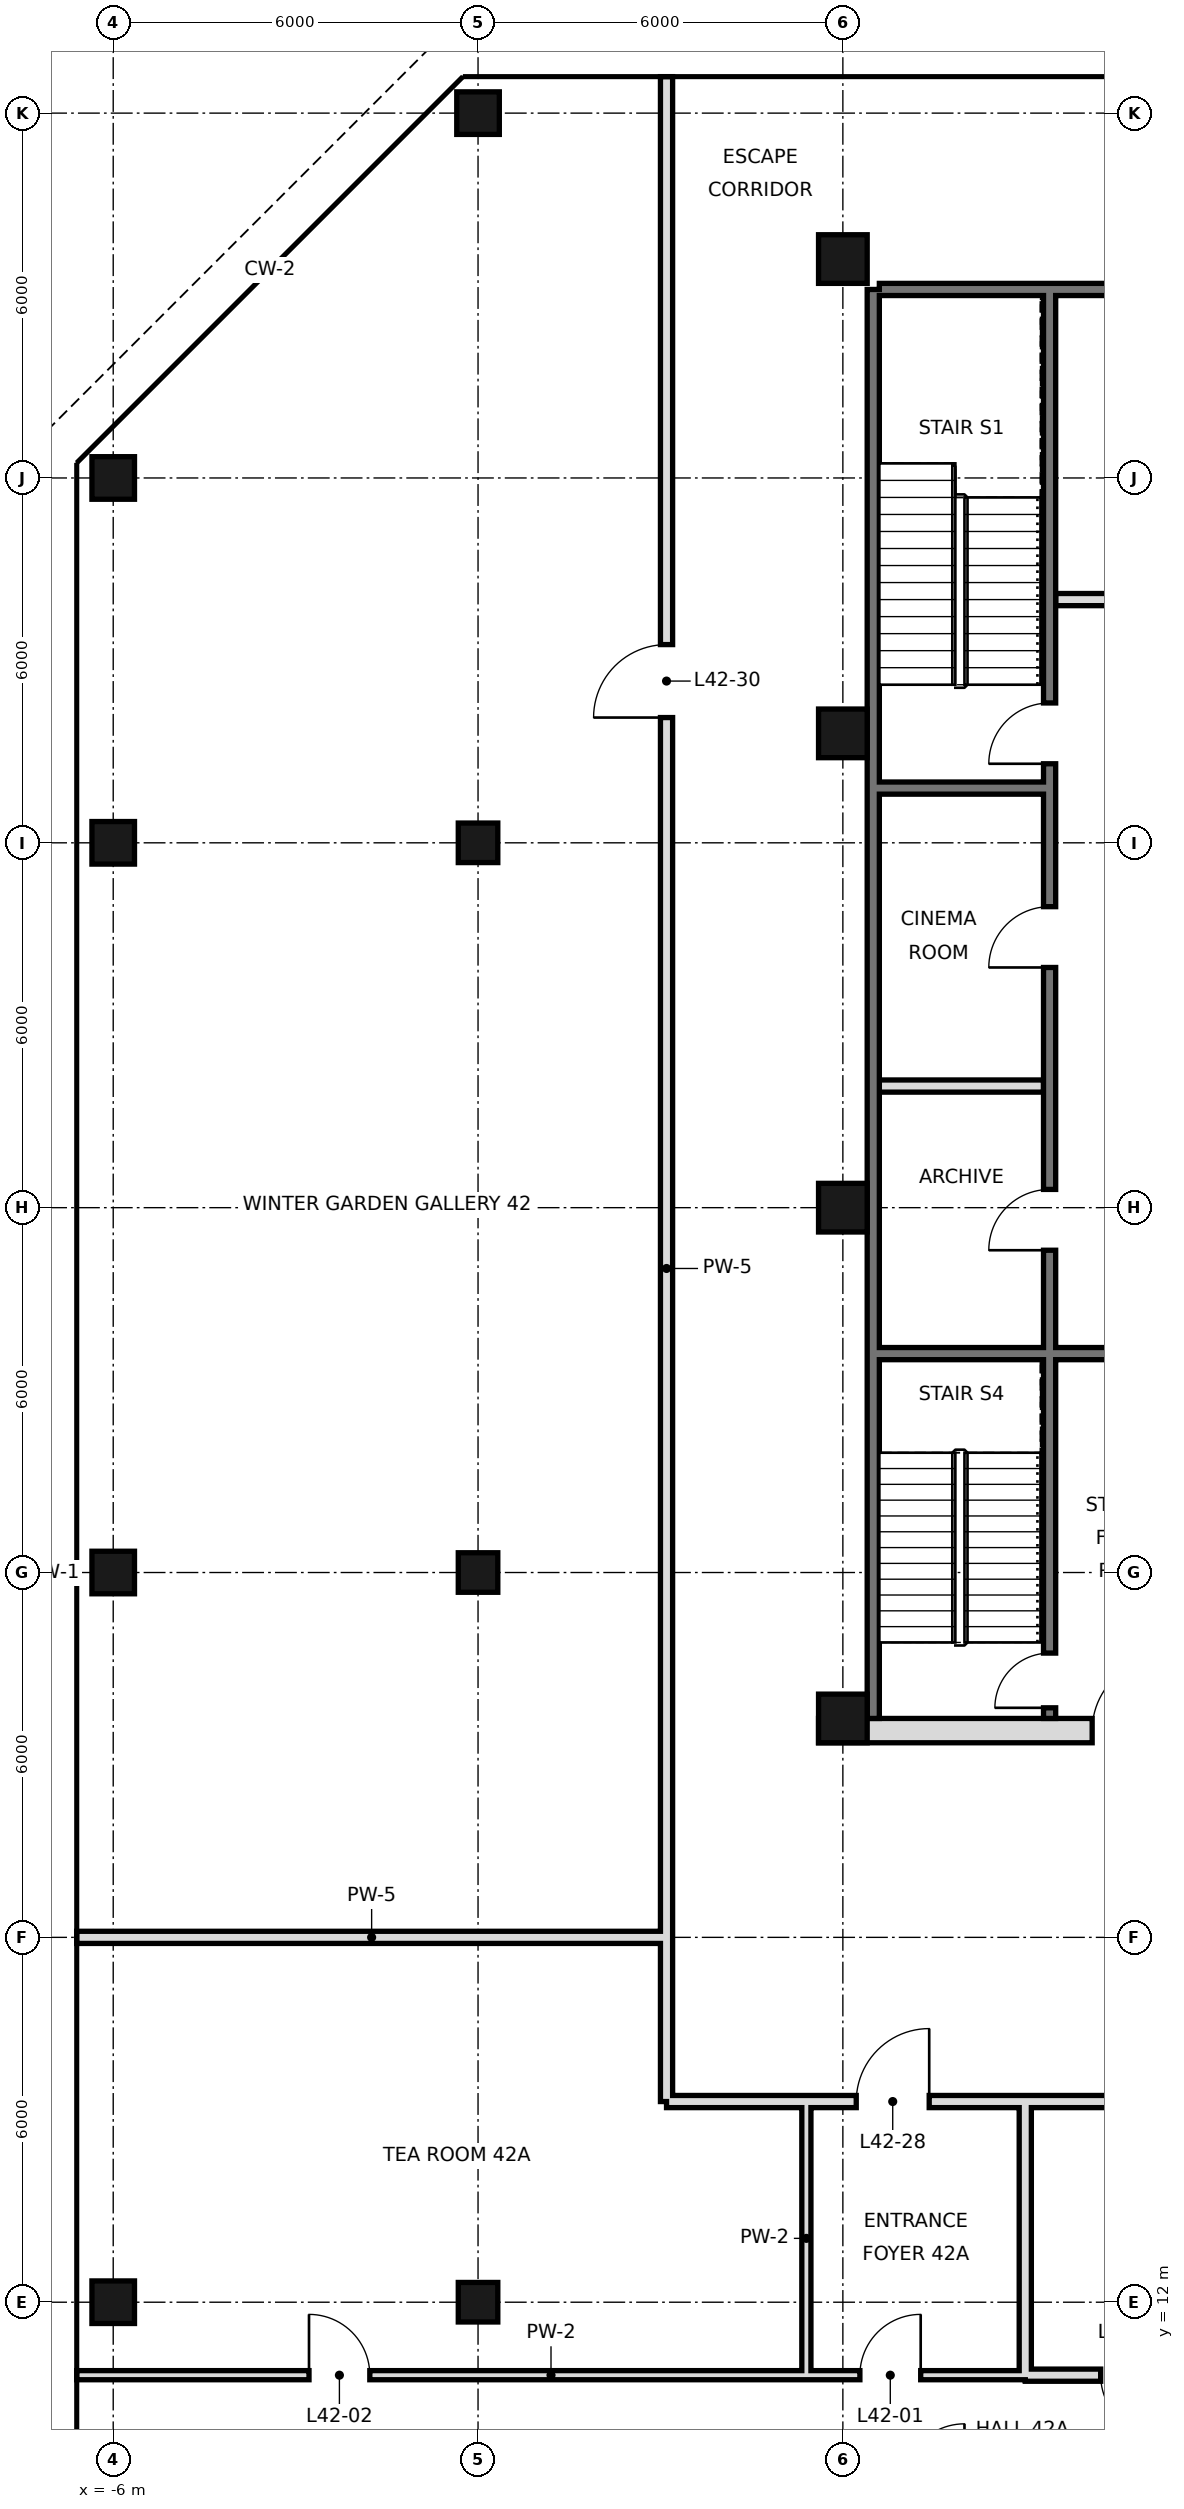
"""IFC4 building model, lengths in metres.
Left out: names, types, materials, properties, quantities, classifications, styles, units other than length and angle.
Written with IfcOpenShell. Run it as: python <this file> out.ifc"""

import sys

from ifc_helpers import new_model, si_unit, direction, frame, frame_2d, origin, origin_2d, place, context, subcontext, project, spatial, rectangle, hollow_rectangle, extrude, element, fill, save


model = new_model("IFC4")
c1 = context("Model", 3, precision=1e-05, world=origin(), true_north=direction((0.0, 1.0)))
c2 = subcontext(c1, "Body", "Model", "MODEL_VIEW")
j1 = project(units=[si_unit("LENGTHUNIT", "METRE"), si_unit("PLANEANGLEUNIT", "RADIAN")], contexts=[c1])
p1 = place(None, origin())
s1 = spatial("IfcSite", under=j1, at=p1, CompositionType="ELEMENT")
p2 = place(p1, origin())
s2 = spatial("IfcBuilding", under=s1, at=p2, CompositionType="ELEMENT")
p3 = place(p2, frame((0.0, 0.0, 181.6)))
s3 = spatial("IfcBuildingStorey", under=s2, at=p3, CompositionType="ELEMENT", Elevation=181.6)
for number, where, z_axis, x_axis in (
    (1, (-6.0, 12.0, 0.0), (0.0, 0.0, 1.0), (1.0, 0.0, 0.0)),
    (2, (-6.0, 24.0, 0.0), (0.0, 0.0, 1.0), (1.0, 0.0, 0.0)),
    (3, (-6.0, 36.0, 0.0), (0.0, 0.0, 1.0), (1.0, 0.0, 0.0)),
    (4, (-6.0, 42.0, 0.0), (0.0, 0.0, 1.0), (1.0, 0.0, 0.0)),
):
    element("IfcColumn", number, at=place(p3, frame(where, z_axis=z_axis, x_axis=x_axis)), inside=s3, PredefinedType="COLUMN", context=c2, shape_type="SweptSolid", body=[
        extrude(hollow_rectangle(XDim=0.7, YDim=0.7, WallThickness=0.036, at=origin_2d()), origin(), (0.0, 0.0, 1.0), 4.4),
    ])
for number, where, z_axis, x_axis in (
    (5, (0.0, 12.0, 0.0), (0.0, 0.0, 1.0), (1.0, 0.0, 0.0)),
    (6, (0.0, 24.0, 0.0), (0.0, 0.0, 1.0), (1.0, 0.0, 0.0)),
    (7, (0.0, 36.0, 0.0), (0.0, 0.0, 1.0), (1.0, 0.0, 0.0)),
):
    element("IfcColumn", number, at=place(p3, frame(where, z_axis=z_axis, x_axis=x_axis)), inside=s3, PredefinedType="COLUMN", context=c2, shape_type="SweptSolid", body=[
        extrude(hollow_rectangle(XDim=0.65, YDim=0.65, WallThickness=0.032, at=origin_2d()), origin(), (0.0, 0.0, 1.0), 4.4),
    ])
p4 = place(p3, frame((0.0, 48.0, 0.0), z_axis=(0.0, 0.0, 1.0), x_axis=(1.0, 0.0, 0.0)))
e8 = element("IfcColumn", 8, at=p4, inside=s3, PredefinedType="COLUMN", context=c2, shape_type="SweptSolid", body=[
    extrude(hollow_rectangle(XDim=0.7, YDim=0.7, WallThickness=0.036, at=origin_2d()), origin(), (0.0, 0.0, 1.0), 4.4),
])
for number, where, z_axis, x_axis in (
    (9, (6.0, 21.6, 0.0), (0.0, 0.0, 1.0), (1.0, 0.0, 0.0)),
    (10, (6.0, 30.0, 0.0), (0.0, 0.0, 1.0), (1.0, 0.0, 0.0)),
    (11, (6.0, 37.8, 0.0), (0.0, 0.0, 1.0), (1.0, 0.0, 0.0)),
    (12, (6.0, 45.6, 0.0), (0.0, 0.0, 1.0), (1.0, 0.0, 0.0)),
):
    element("IfcColumn", number, at=place(p3, frame(where, z_axis=z_axis, x_axis=x_axis)), inside=s3, PredefinedType="COLUMN", context=c2, shape_type="SweptSolid", body=[
        extrude(hollow_rectangle(XDim=0.8, YDim=0.8, WallThickness=0.045, at=origin_2d()), origin(), (0.0, 0.0, 1.0), 4.4),
    ])
p5 = place(p3, frame((3.1, 15.3, 0.0), z_axis=(0.0, 0.0, 1.0), x_axis=(0.0, 1.0, 0.0)))
e13 = element("IfcWall", 13, at=p5, inside=s3, PredefinedType="SOLIDWALL", context=c2, shape_type="SweptSolid", body=[
    extrude(rectangle(XDim=33.3, YDim=0.2, at=frame_2d((16.65, 0.0))), origin(), (0.0, 0.0, 1.0), 3.4),
])
p6 = place(p5, frame((22.76, 0.0, 0.0)))
e14 = element("IfcOpeningElement", 14, at=p6, cuts=e13, PredefinedType="OPENING", context=c2, shape_type="SweptSolid", body=[
    extrude(rectangle(XDim=1.2, YDim=2.4, at=frame_2d((0.6, 1.2))), frame((0.0, 0.11, 0.0), z_axis=(0.0, -1.0, 0.0), x_axis=(1.0, 0.0, 0.0)), (0.0, 0.0, 1.0), 0.22),
])
p7 = place(p3, frame((5.4, 10.8, 0.0), z_axis=(0.0, 0.0, 1.0), x_axis=(0.0, 1.0, 0.0)))
e15 = element("IfcWall", 15, at=p7, inside=s3, PredefinedType="PARTITIONING", context=c2, shape_type="SweptSolid", body=[
    extrude(rectangle(XDim=4.5, YDim=0.15, at=frame_2d((2.25, 0.0))), origin(), (0.0, 0.0, 1.0), 4.1),
])
p8 = place(p3, frame((9.0, 10.8, 0.0), z_axis=(0.0, 0.0, 1.0), x_axis=(0.0, 1.0, 0.0)))
e16 = element("IfcWall", 16, at=p8, inside=s3, PredefinedType="SOLIDWALL", context=c2, shape_type="SweptSolid", body=[
    extrude(rectangle(XDim=4.5, YDim=0.2, at=frame_2d((2.25, 0.0))), origin(), (0.0, 0.0, 1.0), 3.4),
])
p9 = place(p3, frame((9.0, 10.8, 0.0), z_axis=(0.0, 0.0, 1.0), x_axis=(1.0, 0.0, 0.0)))
e17 = element("IfcWall", 17, at=p9, inside=s3, PredefinedType="SOLIDWALL", context=c2, shape_type="SweptSolid", body=[
    extrude(rectangle(XDim=4.8, YDim=0.2, at=frame_2d((2.4, 0.0))), origin(), (0.0, 0.0, 1.0), 3.4),
])
p10 = place(p9, frame((1.24, 0.0, 0.0)))
e18 = element("IfcOpeningElement", 18, at=p10, cuts=e17, PredefinedType="OPENING", context=c2, shape_type="SweptSolid", body=[
    extrude(rectangle(XDim=1.0, YDim=2.4, at=frame_2d((0.5, 1.2))), frame((0.0, 0.11, 0.0), z_axis=(0.0, -1.0, 0.0), x_axis=(1.0, 0.0, 0.0)), (0.0, 0.0, 1.0), 0.22),
])
p11 = place(p3, frame((-6.6, 10.8, 0.0), z_axis=(0.0, 0.0, 1.0), x_axis=(1.0, 0.0, 0.0)))
e19 = element("IfcWall", 19, at=p11, inside=s3, PredefinedType="PARTITIONING", context=c2, shape_type="SweptSolid", body=[
    extrude(rectangle(XDim=15.6, YDim=0.15, at=frame_2d((7.8, 0.0))), origin(), (0.0, 0.0, 1.0), 4.1),
])
p12 = place(p11, frame((12.88, 0.0, 0.0)))
e20 = element("IfcOpeningElement", 20, at=p12, cuts=e19, PredefinedType="OPENING", context=c2, shape_type="SweptSolid", body=[
    extrude(rectangle(XDim=1.0, YDim=2.4, at=frame_2d((0.5, 1.2))), frame((0.0, 0.085, 0.0), z_axis=(0.0, -1.0, 0.0), x_axis=(1.0, 0.0, 0.0)), (0.0, 0.0, 1.0), 0.17),
])
p13 = place(p11, frame((3.82, 0.0, 0.0)))
e21 = element("IfcOpeningElement", 21, at=p13, cuts=e19, PredefinedType="OPENING", context=c2, shape_type="SweptSolid", body=[
    extrude(rectangle(XDim=1.0, YDim=2.4, at=frame_2d((0.5, 1.2))), frame((0.0, 0.085, 0.0), z_axis=(0.0, -1.0, 0.0), x_axis=(1.0, 0.0, 0.0)), (0.0, 0.0, 1.0), 0.17),
])
p14 = place(p3, frame((3.1, 15.3, 0.0), z_axis=(0.0, 0.0, 1.0), x_axis=(1.0, 0.0, 0.0)))
e22 = element("IfcWall", 22, at=p14, inside=s3, PredefinedType="SOLIDWALL", context=c2, shape_type="SweptSolid", body=[
    extrude(rectangle(XDim=5.9, YDim=0.2, at=frame_2d((2.95, 0.0))), origin(), (0.0, 0.0, 1.0), 3.4),
])
p15 = place(p14, frame((3.12, 0.0, 0.0)))
e23 = element("IfcOpeningElement", 23, at=p15, cuts=e22, PredefinedType="OPENING", context=c2, shape_type="SweptSolid", body=[
    extrude(rectangle(XDim=1.2, YDim=2.4, at=frame_2d((0.6, 1.2))), frame((0.0, 0.11, 0.0), z_axis=(0.0, -1.0, 0.0), x_axis=(1.0, 0.0, 0.0)), (0.0, 0.0, 1.0), 0.22),
])
p16 = place(p3, frame((9.0, 15.3, 0.0), z_axis=(0.0, 0.0, 1.0), x_axis=(1.0, 0.0, 0.0)))
e24 = element("IfcWall", 24, at=p16, inside=s3, PredefinedType="SOLIDWALL", context=c2, shape_type="SweptSolid", body=[
    extrude(rectangle(XDim=4.8, YDim=0.2, at=frame_2d((2.4, 0.0))), origin(), (0.0, 0.0, 1.0), 4.1),
])
p17 = place(p3, frame((-6.6, 18.0, 0.0), z_axis=(0.0, 0.0, 1.0), x_axis=(1.0, 0.0, 0.0)))
e25 = element("IfcWall", 25, at=p17, inside=s3, PredefinedType="SOLIDWALL", context=c2, shape_type="SweptSolid", body=[
    extrude(rectangle(XDim=9.7, YDim=0.2, at=frame_2d((4.85, 0.0))), origin(), (0.0, 0.0, 1.0), 3.4),
])
p18 = place(p3, frame((6.5, 21.6, 0.0), z_axis=(0.0, 0.0, 1.0), x_axis=(0.0, 1.0, 0.0)))
e26 = element("IfcWall", 26, at=p18, inside=s3, PredefinedType="SOLIDWALL", context=c2, shape_type="SweptSolid", body=[
    extrude(rectangle(XDim=23.5, YDim=0.2, at=frame_2d((11.75, 0.0))), origin(), (0.0, 0.0, 1.0), 4.1),
])
p19 = place(p3, frame((6.6, 45.1, 0.0), z_axis=(0.0, 0.0, 1.0), x_axis=(1.0, 0.0, 0.0)))
e27 = element("IfcWall", 27, at=p19, inside=s3, PredefinedType="SOLIDWALL", context=c2, shape_type="SweptSolid", body=[
    extrude(rectangle(XDim=34.8, YDim=0.2, at=frame_2d((17.4, 0.0))), origin(), (0.0, 0.0, 1.0), 4.1),
])
p20 = place(p3, frame((5.6, 21.4, 0.0), z_axis=(0.0, 0.0, 1.0), x_axis=(1.0, 0.0, 0.0)))
e28 = element("IfcWall", 28, at=p20, inside=s3, PredefinedType="SOLIDWALL", context=c2, shape_type="SweptSolid", body=[
    extrude(rectangle(XDim=36.8, YDim=0.4, at=frame_2d((18.4, 0.0))), origin(), (0.0, 0.0, 1.0), 4.1),
])
p21 = place(p20, frame((8.5, 0.0, 0.0)))
e29 = element("IfcOpeningElement", 29, at=p21, cuts=e28, PredefinedType="OPENING", context=c2, shape_type="SweptSolid", body=[
    extrude(rectangle(XDim=1.8, YDim=2.1, at=frame_2d((0.9, 1.05))), frame((0.0, 0.21, 0.0), z_axis=(0.0, -1.0, 0.0), x_axis=(1.0, 0.0, 0.0)), (0.0, 0.0, 1.0), 0.42),
])
p22 = place(p20, frame((17.5, 0.0, 0.0)))
e30 = element("IfcOpeningElement", 30, at=p22, cuts=e28, PredefinedType="OPENING", context=c2, shape_type="SweptSolid", body=[
    extrude(rectangle(XDim=1.8, YDim=2.1, at=frame_2d((0.9, 1.05))), frame((0.0, 0.21, 0.0), z_axis=(0.0, -1.0, 0.0), x_axis=(1.0, 0.0, 0.0)), (0.0, 0.0, 1.0), 0.42),
])
p23 = place(p20, frame((26.5, 0.0, 0.0)))
e31 = element("IfcOpeningElement", 31, at=p23, cuts=e28, PredefinedType="OPENING", context=c2, shape_type="SweptSolid", body=[
    extrude(rectangle(XDim=1.8, YDim=2.1, at=frame_2d((0.9, 1.05))), frame((0.0, 0.21, 0.0), z_axis=(0.0, -1.0, 0.0), x_axis=(1.0, 0.0, 0.0)), (0.0, 0.0, 1.0), 0.42),
])
p24 = place(p20, frame((4.5, 0.0, 0.0)))
e32 = element("IfcOpeningElement", 32, at=p24, cuts=e28, PredefinedType="OPENING", context=c2, shape_type="SweptSolid", body=[
    extrude(rectangle(XDim=1.2, YDim=2.1, at=frame_2d((0.6, 1.05))), frame((0.0, 0.21, 0.0), z_axis=(0.0, -1.0, 0.0), x_axis=(1.0, 0.0, 0.0)), (0.0, 0.0, 1.0), 0.42),
])
p25 = place(p20, frame((31.1, 0.0, 0.0)))
e33 = element("IfcOpeningElement", 33, at=p25, cuts=e28, PredefinedType="OPENING", context=c2, shape_type="SweptSolid", body=[
    extrude(rectangle(XDim=1.2, YDim=2.1, at=frame_2d((0.6, 1.05))), frame((0.0, 0.21, 0.0), z_axis=(0.0, -1.0, 0.0), x_axis=(1.0, 0.0, 0.0)), (0.0, 0.0, 1.0), 0.42),
])
p26 = place(p3, frame((9.4, 21.6, 0.0), z_axis=(0.0, 0.0, 1.0), x_axis=(0.0, 1.0, 0.0)))
e34 = element("IfcWall", 34, at=p26, inside=s3, PredefinedType="SOLIDWALL", context=c2, shape_type="SweptSolid", body=[
    extrude(rectangle(XDim=23.4, YDim=0.2, at=frame_2d((11.7, 0.0))), origin(), (0.0, 0.0, 1.0), 4.1),
])
p27 = place(p26, frame((7.7, 0.0, 0.0)))
e35 = element("IfcOpeningElement", 35, at=p27, cuts=e34, PredefinedType="OPENING", context=c2, shape_type="SweptSolid", body=[
    extrude(rectangle(XDim=1.0, YDim=2.1, at=frame_2d((0.5, 1.05))), frame((0.0, 0.11, 0.0), z_axis=(0.0, -1.0, 0.0), x_axis=(1.0, 0.0, 0.0)), (0.0, 0.0, 1.0), 0.22),
])
p28 = place(p26, frame((12.35, 0.0, 0.0)))
e36 = element("IfcOpeningElement", 36, at=p28, cuts=e34, PredefinedType="OPENING", context=c2, shape_type="SweptSolid", body=[
    extrude(rectangle(XDim=1.0, YDim=2.1, at=frame_2d((0.5, 1.05))), frame((0.0, 0.11, 0.0), z_axis=(0.0, -1.0, 0.0), x_axis=(1.0, 0.0, 0.0)), (0.0, 0.0, 1.0), 0.22),
])
p29 = place(p26, frame((15.7, 0.0, 0.0)))
e37 = element("IfcOpeningElement", 37, at=p29, cuts=e34, PredefinedType="OPENING", context=c2, shape_type="SweptSolid", body=[
    extrude(rectangle(XDim=1.0, YDim=2.1, at=frame_2d((0.5, 1.05))), frame((0.0, 0.11, 0.0), z_axis=(0.0, -1.0, 0.0), x_axis=(1.0, 0.0, 0.0)), (0.0, 0.0, 1.0), 0.22),
])
p30 = place(p26, frame((0.175, 0.0, 0.0)))
e38 = element("IfcOpeningElement", 38, at=p30, cuts=e34, PredefinedType="OPENING", context=c2, shape_type="SweptSolid", body=[
    extrude(rectangle(XDim=0.9, YDim=2.1, at=frame_2d((0.45, 1.05))), frame((0.0, 0.11, 0.0), z_axis=(0.0, -1.0, 0.0), x_axis=(1.0, 0.0, 0.0)), (0.0, 0.0, 1.0), 0.22),
])
p31 = place(p3, frame((6.6, 27.6, 0.0), z_axis=(0.0, 0.0, 1.0), x_axis=(1.0, 0.0, 0.0)))
e39 = element("IfcWall", 39, at=p31, inside=s3, PredefinedType="SOLIDWALL", context=c2, shape_type="SweptSolid", body=[
    extrude(rectangle(XDim=5.3, YDim=0.2, at=frame_2d((2.65, 0.0))), origin(), (0.0, 0.0, 1.0), 4.1),
])
p32 = place(p3, frame((6.6, 32.0, 0.0), z_axis=(0.0, 0.0, 1.0), x_axis=(1.0, 0.0, 0.0)))
e40 = element("IfcWall", 40, at=p32, inside=s3, PredefinedType="PARTITIONING", context=c2, shape_type="SweptSolid", body=[
    extrude(rectangle(XDim=2.7, YDim=0.2, at=frame_2d((1.35, 0.0))), origin(), (0.0, 0.0, 1.0), 4.1),
])
p33 = place(p3, frame((6.6, 36.9, 0.0), z_axis=(0.0, 0.0, 1.0), x_axis=(1.0, 0.0, 0.0)))
e41 = element("IfcWall", 41, at=p33, inside=s3, PredefinedType="SOLIDWALL", context=c2, shape_type="SweptSolid", body=[
    extrude(rectangle(XDim=2.7, YDim=0.2, at=frame_2d((1.35, 0.0))), origin(), (0.0, 0.0, 1.0), 4.1),
])
p34 = place(p3, frame((9.5, 40.0, 0.0), z_axis=(0.0, 0.0, 1.0), x_axis=(1.0, 0.0, 0.0)))
e42 = element("IfcWall", 42, at=p34, inside=s3, PredefinedType="PARTITIONING", context=c2, shape_type="SweptSolid", body=[
    extrude(rectangle(XDim=5.0, YDim=0.2, at=frame_2d((2.5, 0.0))), origin(), (0.0, 0.0, 1.0), 4.1),
])
p35 = place(p34, frame((1.9, 0.0, 0.0)))
e43 = element("IfcOpeningElement", 43, at=p35, cuts=e42, PredefinedType="OPENING", context=c2, shape_type="SweptSolid", body=[
    extrude(rectangle(XDim=1.2, YDim=2.1, at=frame_2d((0.6, 1.05))), frame((0.0, 0.11, 0.0), z_axis=(0.0, -1.0, 0.0), x_axis=(1.0, 0.0, 0.0)), (0.0, 0.0, 1.0), 0.22),
])
p36 = place(p12, frame((1.0, 0.0, 0.0), z_axis=(0.0, 0.0, 1.0), x_axis=(-1.0, 0.0, 0.0)))
e44 = element("IfcDoor", 44, at=p36, inside=s3, OperationType="SINGLE_SWING_LEFT", PredefinedType="DOOR", context=c2, shape_type="SweptSolid", body=[
    extrude(rectangle(XDim=1.0, YDim=2.4, at=frame_2d((0.5, 1.2))), frame((0.0, 0.025, 0.0), z_axis=(0.0, -1.0, 0.0), x_axis=(1.0, 0.0, 0.0)), (0.0, 0.0, 1.0), 0.05),
])
fill(e20, e44)
p37 = place(p13, origin())
e45 = element("IfcDoor", 45, at=p37, inside=s3, OperationType="SINGLE_SWING_LEFT", PredefinedType="DOOR", context=c2, shape_type="SweptSolid", body=[
    extrude(rectangle(XDim=1.0, YDim=2.4, at=frame_2d((0.5, 1.2))), frame((0.0, 0.025, 0.0), z_axis=(0.0, -1.0, 0.0), x_axis=(1.0, 0.0, 0.0)), (0.0, 0.0, 1.0), 0.05),
])
fill(e21, e45)
p38 = place(p10, origin())
e46 = element("IfcDoor", 46, at=p38, inside=s3, OperationType="SINGLE_SWING_RIGHT", PredefinedType="DOOR", context=c2, shape_type="SweptSolid", body=[
    extrude(rectangle(XDim=1.0, YDim=2.4, at=frame_2d((0.5, 1.2))), frame((0.0, 0.025, 0.0), z_axis=(0.0, -1.0, 0.0), x_axis=(1.0, 0.0, 0.0)), (0.0, 0.0, 1.0), 0.05),
])
fill(e18, e46)
p39 = place(p15, frame((1.2, 0.0, 0.0), z_axis=(0.0, 0.0, 1.0), x_axis=(-1.0, 0.0, 0.0)))
e47 = element("IfcDoor", 47, at=p39, inside=s3, OperationType="SINGLE_SWING_LEFT", PredefinedType="DOOR", context=c2, shape_type="SweptSolid", body=[
    extrude(rectangle(XDim=1.2, YDim=2.4, at=frame_2d((0.6, 1.2))), frame((0.0, 0.025, 0.0), z_axis=(0.0, -1.0, 0.0), x_axis=(1.0, 0.0, 0.0)), (0.0, 0.0, 1.0), 0.05),
])
fill(e23, e47)
p40 = place(p6, origin())
e48 = element("IfcDoor", 48, at=p40, inside=s3, OperationType="SINGLE_SWING_LEFT", PredefinedType="DOOR", context=c2, shape_type="SweptSolid", body=[
    extrude(rectangle(XDim=1.2, YDim=2.4, at=frame_2d((0.6, 1.2))), frame((0.0, 0.025, 0.0), z_axis=(0.0, -1.0, 0.0), x_axis=(1.0, 0.0, 0.0)), (0.0, 0.0, 1.0), 0.05),
])
fill(e14, e48)
p41 = place(p24, frame((1.2, 0.0, 0.0), z_axis=(0.0, 0.0, 1.0), x_axis=(-1.0, 0.0, 0.0)))
e49 = element("IfcDoor", 49, at=p41, inside=s3, OperationType="SINGLE_SWING_LEFT", PredefinedType="DOOR", context=c2, shape_type="SweptSolid", body=[
    extrude(rectangle(XDim=1.2, YDim=2.1, at=frame_2d((0.6, 1.05))), frame((0.0, 0.025, 0.0), z_axis=(0.0, -1.0, 0.0), x_axis=(1.0, 0.0, 0.0)), (0.0, 0.0, 1.0), 0.05),
])
fill(e32, e49)
p42 = place(p27, origin())
e50 = element("IfcDoor", 50, at=p42, inside=s3, OperationType="SINGLE_SWING_LEFT", PredefinedType="DOOR", context=c2, shape_type="SweptSolid", body=[
    extrude(rectangle(XDim=1.0, YDim=2.1, at=frame_2d((0.5, 1.05))), frame((0.0, 0.025, 0.0), z_axis=(0.0, -1.0, 0.0), x_axis=(1.0, 0.0, 0.0)), (0.0, 0.0, 1.0), 0.05),
])
fill(e35, e50)
p43 = place(p28, origin())
e51 = element("IfcDoor", 51, at=p43, inside=s3, OperationType="SINGLE_SWING_LEFT", PredefinedType="DOOR", context=c2, shape_type="SweptSolid", body=[
    extrude(rectangle(XDim=1.0, YDim=2.1, at=frame_2d((0.5, 1.05))), frame((0.0, 0.025, 0.0), z_axis=(0.0, -1.0, 0.0), x_axis=(1.0, 0.0, 0.0)), (0.0, 0.0, 1.0), 0.05),
])
fill(e36, e51)
p44 = place(p29, origin())
e52 = element("IfcDoor", 52, at=p44, inside=s3, OperationType="SINGLE_SWING_LEFT", PredefinedType="DOOR", context=c2, shape_type="SweptSolid", body=[
    extrude(rectangle(XDim=1.0, YDim=2.1, at=frame_2d((0.5, 1.05))), frame((0.0, 0.025, 0.0), z_axis=(0.0, -1.0, 0.0), x_axis=(1.0, 0.0, 0.0)), (0.0, 0.0, 1.0), 0.05),
])
fill(e37, e52)
p45 = place(p30, origin())
e53 = element("IfcDoor", 53, at=p45, inside=s3, OperationType="SINGLE_SWING_LEFT", PredefinedType="DOOR", context=c2, shape_type="SweptSolid", body=[
    extrude(rectangle(XDim=0.9, YDim=2.1, at=frame_2d((0.45, 1.05))), frame((0.0, 0.025, 0.0), z_axis=(0.0, -1.0, 0.0), x_axis=(1.0, 0.0, 0.0)), (0.0, 0.0, 1.0), 0.05),
])
fill(e38, e53)
save(model, sys.argv[1])
